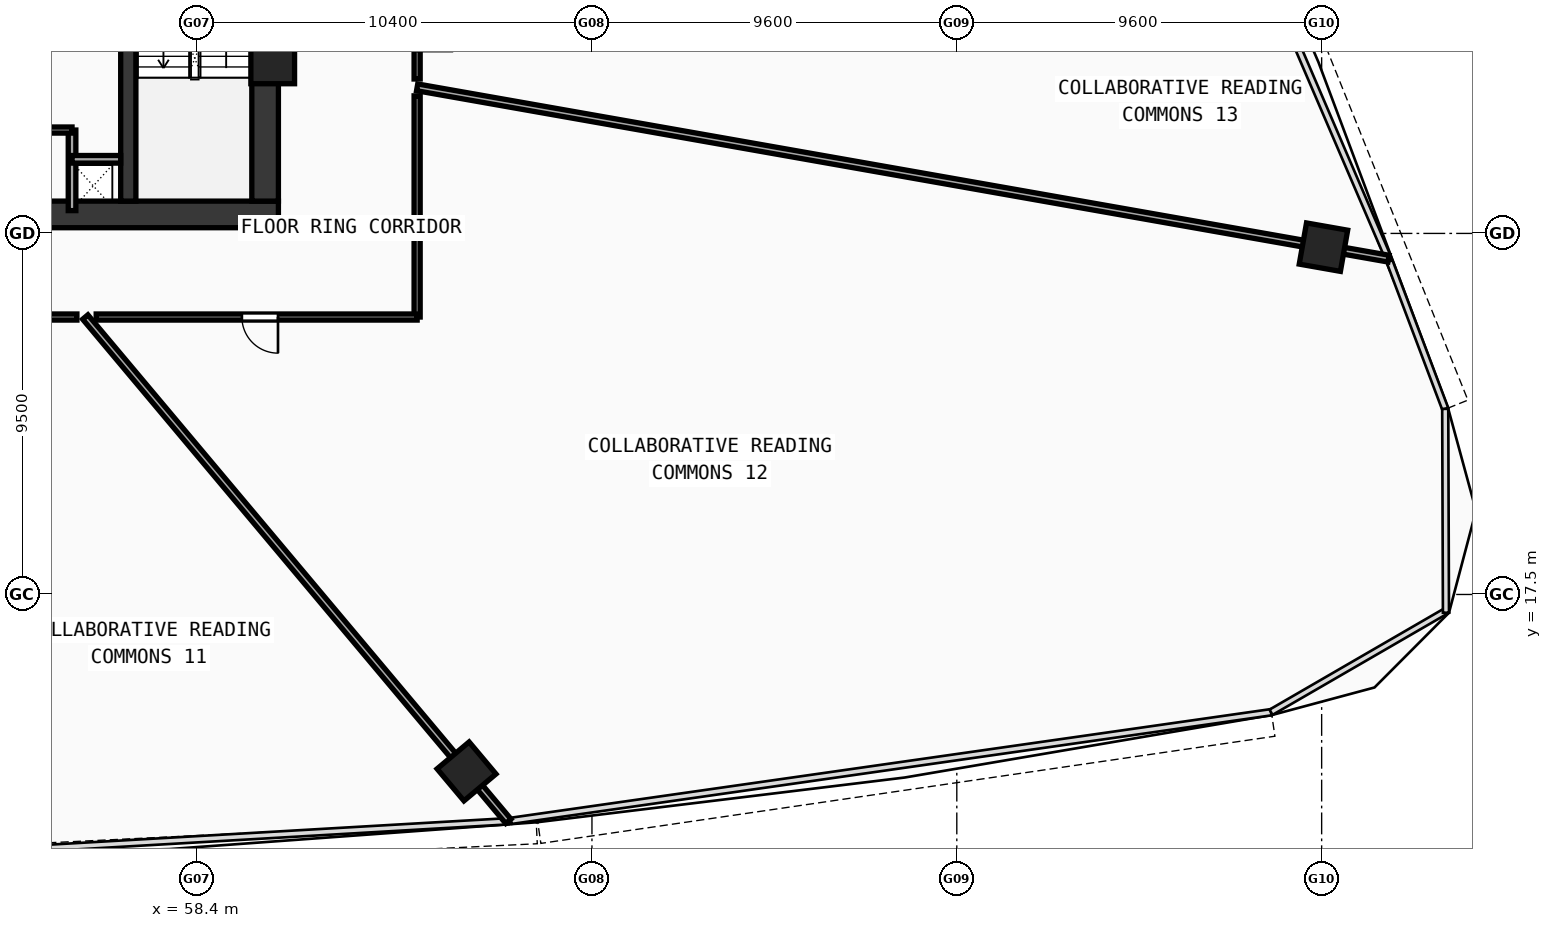
"""IFC4 building model, lengths in metres.
Left out: names, types, materials, properties, quantities, classifications, styles, units other than length and angle.
Written with IfcOpenShell. Run it as: python <this file> out.ifc"""

import sys

from ifc_helpers import new_model, si_unit, direction, frame, frame_2d, origin, origin_with_axes, origin_2d, place, context, subcontext, project, spatial, rectangle, hollow_rectangle, extrude, source, transform, mapped, element, fill, save


model = new_model("IFC4")
c1 = context("Model", 3, precision=1e-05, world=origin(), true_north=direction((0.0, 1.0)))
c2 = subcontext(c1, "Body", "Model", "MODEL_VIEW")
j1 = project(units=[si_unit("LENGTHUNIT", "METRE"), si_unit("PLANEANGLEUNIT", "RADIAN")], contexts=[c1])
p1 = place(None, origin())
s1 = spatial("IfcSite", under=j1, at=p1, CompositionType="ELEMENT")
p2 = place(p1, origin())
s2 = spatial("IfcBuilding", under=s1, at=p2, CompositionType="ELEMENT")
p3 = place(p2, frame((0.0, 0.0, 48.55)))
s3 = spatial("IfcBuildingStorey", under=s2, at=p3, CompositionType="ELEMENT", Elevation=48.55)
p4 = place(p3, frame((35.45, 27.5, 0.0), z_axis=(0.0, 0.0, 1.0), x_axis=(1.0, 0.0, 0.0)))
e1 = element("IfcWall", 1, at=p4, inside=s3, PredefinedType="SHEAR", context=c2, shape_type="SweptSolid", body=[
    extrude(rectangle(XDim=25.1, YDim=0.7, at=frame_2d((12.55, 0.0))), origin(), (0.0, 0.0, 1.0), 3.37),
])
p5 = place(p3, frame((60.2, 27.85, 0.0), z_axis=(0.0, 0.0, 1.0), x_axis=(0.0, 1.0, 0.0)))
e2 = element("IfcWall", 2, at=p5, inside=s3, PredefinedType="SHEAR", context=c2, shape_type="SweptSolid", body=[
    extrude(rectangle(XDim=12.0, YDim=0.7, at=frame_2d((6.0, 0.0))), origin(), (0.0, 0.0, 1.0), 3.37),
])
p6 = place(p3, frame((56.6, 27.85, 0.0), z_axis=(0.0, 0.0, 1.0), x_axis=(0.0, 1.0, 0.0)))
e3 = element("IfcWall", 3, at=p6, inside=s3, PredefinedType="SHEAR", context=c2, shape_type="SweptSolid", body=[
    extrude(rectangle(XDim=12.0, YDim=0.4, at=frame_2d((6.0, 0.0))), origin(), (0.0, 0.0, 1.0), 3.37),
])
p7 = place(p6, frame((9.9, 0.0, 0.0)))
e4 = element("IfcOpeningElement", 4, at=p7, cuts=e3, PredefinedType="OPENING", context=c2, shape_type="SweptSolid", body=[
    extrude(rectangle(XDim=1.1, YDim=2.1, at=frame_2d((0.55, 1.05))), frame((0.0, 0.21, 0.0), z_axis=(0.0, -1.0, 0.0), x_axis=(1.0, 0.0, 0.0)), (0.0, 0.0, 1.0), 0.42),
])
m1 = source(origin(), c2, "Body", "SweptSolid", [
    extrude(hollow_rectangle(XDim=1.15, YDim=1.15, WallThickness=0.048, at=origin_2d()), origin(), (0.0, 0.0, 1.0), 3.63),
])
p8 = place(p3, frame((60.4, 31.513, -0.26), z_axis=(0.0, 0.0, 1.0), x_axis=(1.0, 0.0, 0.0)))
e5 = element("IfcColumn", 5, at=p8, inside=s3, PredefinedType="COLUMN", context=c2, shape_type="MappedRepresentation", body=[
    mapped(m1, transform((0.0, 0.0, 0.0), scale=1.0)),
])
m2 = source(origin(), c2, "Body", "SweptSolid", [
    extrude(hollow_rectangle(XDim=1.1, YDim=1.1, WallThickness=0.045, at=origin_2d()), origin(), (0.0, 0.0, 1.0), 3.63),
])
for number, where, z_axis, x_axis in (
    (6, (65.5, 12.844, -0.26), (0.0, 0.0, 1.0), (0.766, 0.643, 0.0)),
    (7, (88.048, 26.638, -0.26), (0.0, 0.0, 1.0), (0.174, 0.985, 0.0)),
):
    element("IfcColumn", number, at=place(p3, frame(where, z_axis=z_axis, x_axis=x_axis)), inside=s3, PredefinedType="COLUMN", context=c2, shape_type="MappedRepresentation", body=[
        mapped(m2, transform((0.0, 0.0, 0.0), scale=1.0)),
    ])
p9 = place(p3, frame((55.12, 27.6, 0.0), z_axis=(0.0, 0.0, 1.0), x_axis=(0.0, 1.0, 0.0)))
e8 = element("IfcWall", 8, at=p9, inside=s3, PredefinedType="SOLIDWALL", context=c2, shape_type="SweptSolid", body=[
    extrude(rectangle(XDim=2.12, YDim=0.2, at=frame_2d((1.06, 0.0))), origin(), (0.0, 0.0, 1.0), 3.37),
])
p10 = place(p3, frame((55.12, 28.95, 0.0), z_axis=(0.0, 0.0, 1.0), x_axis=(1.0, 0.0, 0.0)))
e9 = element("IfcWall", 9, at=p10, inside=s3, PredefinedType="SOLIDWALL", context=c2, shape_type="SweptSolid", body=[
    extrude(rectangle(XDim=1.28, YDim=0.2, at=frame_2d((0.64, 0.0))), origin(), (0.0, 0.0, 1.0), 3.37),
])
p11 = place(p3, frame((51.05, 29.72, 0.0), z_axis=(0.0, 0.0, 1.0), x_axis=(1.0, 0.0, 0.0)))
e10 = element("IfcWall", 10, at=p11, inside=s3, PredefinedType="PARTITIONING", context=c2, shape_type="SweptSolid", body=[
    extrude(rectangle(XDim=4.07, YDim=0.16, at=frame_2d((2.035, 0.0))), origin(), (0.0, 0.0, 1.0), 3.37),
])
p12 = place(p11, frame((0.5, 0.0, 0.0)))
e11 = element("IfcOpeningElement", 11, at=p12, cuts=e10, PredefinedType="OPENING", context=c2, shape_type="SweptSolid", body=[
    extrude(rectangle(XDim=0.9, YDim=2.1, at=frame_2d((0.45, 1.05))), frame((0.0, 0.09, 0.0), z_axis=(0.0, -1.0, 0.0), x_axis=(1.0, 0.0, 0.0)), (0.0, 0.0, 1.0), 0.18),
])
p13 = place(p3, frame((55.468, 24.8, 0.0), z_axis=(0.0, 0.0, 1.0), x_axis=(0.642784696521, -0.766046887546, 0.0)))
e12 = element("IfcWall", 12, at=p13, inside=s3, PredefinedType="PARTITIONING", context=c2, shape_type="SweptSolid", body=[
    extrude(rectangle(XDim=17.319, YDim=0.18, at=frame_2d((8.659, 0.0))), origin(), (0.0, 0.0, 1.0), 2.67),
])
p14 = place(p3, frame((64.2, 30.844, 0.0), z_axis=(0.0, 0.0, 1.0), x_axis=(0.984807792045, -0.173647956302, 0.0)))
e13 = element("IfcWall", 13, at=p14, inside=s3, PredefinedType="PARTITIONING", context=c2, shape_type="SweptSolid", body=[
    extrude(rectangle(XDim=25.954, YDim=0.18, at=frame_2d((12.977, 0.0))), origin(), (0.0, 0.0, 1.0), 2.67),
])
p15 = place(p3, frame((64.2, 33.48, 0.0), z_axis=(0.0, 0.0, 1.0), x_axis=(0.0, -1.0, 0.0)))
e14 = element("IfcWall", 14, at=p15, inside=s3, PredefinedType="PARTITIONING", context=c2, shape_type="SweptSolid", body=[
    extrude(rectangle(XDim=2.417, YDim=0.16, at=frame_2d((1.208, 0.0))), origin(), (0.0, 0.0, 1.0), 3.37),
])
p16 = place(p15, frame((0.733, 0.0, 0.0)))
e15 = element("IfcOpeningElement", 15, at=p16, cuts=e14, PredefinedType="OPENING", context=c2, shape_type="SweptSolid", body=[
    extrude(rectangle(XDim=0.95, YDim=2.1, at=frame_2d((0.475, 1.05))), frame((0.0, 0.09, 0.0), z_axis=(0.0, -1.0, 0.0), x_axis=(1.0, 0.0, 0.0)), (0.0, 0.0, 1.0), 0.18),
])
p17 = place(p3, frame((64.2, 30.62, 0.0), z_axis=(0.0, 0.0, 1.0), x_axis=(0.0, -1.0, 0.0)))
e16 = element("IfcWall", 16, at=p17, inside=s3, PredefinedType="PARTITIONING", context=c2, shape_type="SweptSolid", body=[
    extrude(rectangle(XDim=5.82, YDim=0.16, at=frame_2d((2.91, 0.0))), origin(), (0.0, 0.0, 1.0), 2.97),
])
p18 = place(p3, frame((64.2, 24.8, 0.0), z_axis=(0.0, 0.0, 1.0), x_axis=(-1.0, 0.0, 0.0)))
e17 = element("IfcWall", 17, at=p18, inside=s3, PredefinedType="PARTITIONING", context=c2, shape_type="SweptSolid", body=[
    extrude(rectangle(XDim=8.445, YDim=0.16, at=frame_2d((4.222, 0.0))), origin(), (0.0, 0.0, 1.0), 2.97),
])
p19 = place(p18, frame((3.661, 0.0, 0.0)))
e18 = element("IfcOpeningElement", 18, at=p19, cuts=e17, PredefinedType="OPENING", context=c2, shape_type="SweptSolid", body=[
    extrude(rectangle(XDim=0.95, YDim=2.1, at=frame_2d((0.475, 1.05))), frame((0.0, 0.09, 0.0), z_axis=(0.0, -1.0, 0.0), x_axis=(1.0, 0.0, 0.0)), (0.0, 0.0, 1.0), 0.18),
])
p20 = place(p3, frame((55.248, 24.8, 0.0), z_axis=(0.0, 0.0, 1.0), x_axis=(-1.0, 0.0, 0.0)))
e19 = element("IfcWall", 19, at=p20, inside=s3, PredefinedType="PARTITIONING", context=c2, shape_type="SweptSolid", body=[
    extrude(rectangle(XDim=4.635, YDim=0.16, at=frame_2d((2.318, 0.0))), origin(), (0.0, 0.0, 1.0), 2.67),
])
p21 = place(p20, frame((1.847, 0.0, 0.0)))
e20 = element("IfcOpeningElement", 20, at=p21, cuts=e19, PredefinedType="OPENING", context=c2, shape_type="SweptSolid", body=[
    extrude(rectangle(XDim=0.95, YDim=2.1, at=frame_2d((0.475, 1.05))), frame((0.0, 0.09, 0.0), z_axis=(0.0, -1.0, 0.0), x_axis=(1.0, 0.0, 0.0)), (0.0, 0.0, 1.0), 0.18),
])
m3 = source(origin(), c2, "Body", "SweptSolid", [
    extrude(rectangle(XDim=0.95, YDim=2.1, at=frame_2d((0.475, 1.05))), frame((0.0, 0.025, 0.0), z_axis=(0.0, -1.0, 0.0), x_axis=(1.0, 0.0, 0.0)), (0.0, 0.0, 1.0), 0.05),
])
p22 = place(p19, origin_with_axes())
e21 = element("IfcDoor", 21, at=p22, inside=s3, OperationType="SINGLE_SWING_LEFT", PredefinedType="DOOR", context=c2, shape_type="MappedRepresentation", body=[
    mapped(m3, transform((0.0, 0.0, 0.0), scale=1.0)),
])
fill(e18, e21)
save(model, sys.argv[1])
